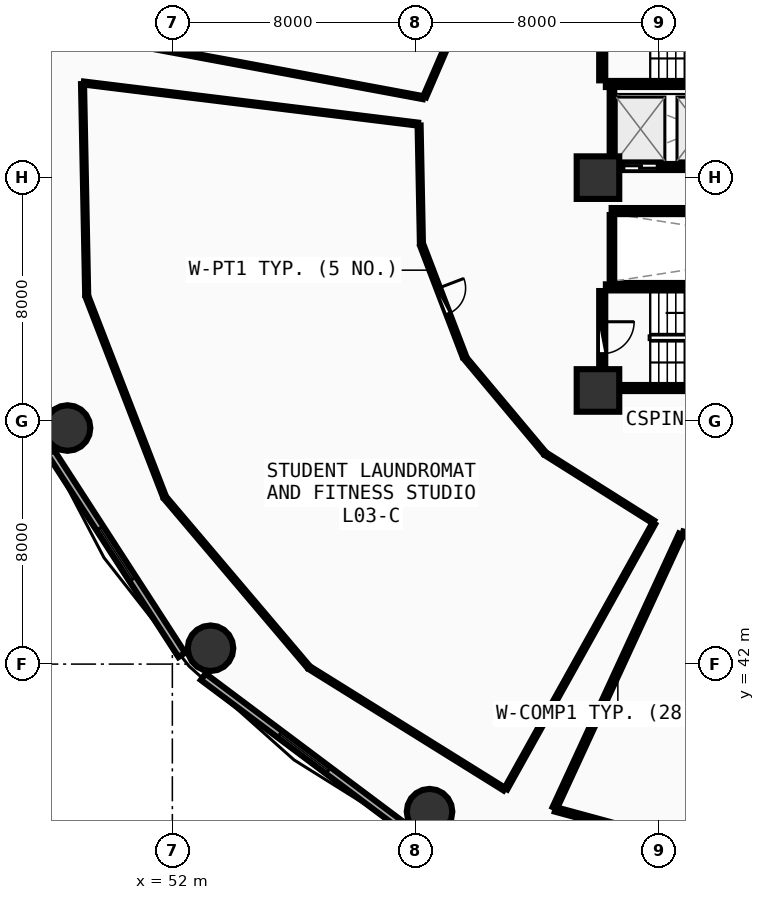
"""IFC4 building model, lengths in metres.
Left out: names, types, materials, properties, quantities, classifications, styles, units other than length and angle.
Written with IfcOpenShell. Run it as: python <this file> out.ifc"""

import sys

from ifc_helpers import new_model, si_unit, direction, frame, frame_2d, origin, origin_2d, place, context, subcontext, project, spatial, rectangle, circle, extrude, element, fill, save


model = new_model("IFC4")
c1 = context("Model", 3, precision=1e-05, world=origin(), true_north=direction((0.0, 1.0)))
c2 = subcontext(c1, "Body", "Model", "MODEL_VIEW")
j1 = project(units=[si_unit("LENGTHUNIT", "METRE"), si_unit("PLANEANGLEUNIT", "RADIAN")], contexts=[c1])
p1 = place(None, origin())
s1 = spatial("IfcSite", under=j1, at=p1, CompositionType="ELEMENT")
p2 = place(p1, origin())
s2 = spatial("IfcBuilding", under=s1, at=p2, CompositionType="ELEMENT")
p3 = place(p2, frame((0.0, 0.0, 13.5)))
s3 = spatial("IfcBuildingStorey", under=s2, at=p3, CompositionType="ELEMENT", Elevation=13.5)
for number, where, z_axis, x_axis in (
    (1, (66.0, 51.0, 0.0), (0.0, 0.0, 1.0), (1.0, 0.0, 0.0)),
    (2, (66.0, 58.0, 0.0), (0.0, 0.0, 1.0), (1.0, 0.0, 0.0)),
):
    element("IfcColumn", number, at=place(p3, frame(where, z_axis=z_axis, x_axis=x_axis)), inside=s3, PredefinedType="PILASTER", context=c2, shape_type="SweptSolid", body=[
        extrude(rectangle(XDim=1.4, YDim=1.4, at=origin_2d()), origin(), (0.0, 0.0, 1.0), 4.5),
    ])
for number, where, z_axis, x_axis in (
    (3, (48.553, 49.764, 0.0), (0.0, 0.0, 1.0), (1.0, 0.0, 0.0)),
    (4, (53.256, 42.522, 0.0), (0.0, 0.0, 1.0), (1.0, 0.0, 0.0)),
    (5, (60.46, 37.146, 0.0), (0.0, 0.0, 1.0), (1.0, 0.0, 0.0)),
):
    element("IfcColumn", number, at=place(p3, frame(where, z_axis=z_axis, x_axis=x_axis)), inside=s3, PredefinedType="COLUMN", context=c2, shape_type="SweptSolid", body=[
        extrude(circle(Radius=0.75, at=origin_2d()), origin(), (0.0, 0.0, 1.0), 4.5),
    ])
p4 = place(p3, frame((48.001, 48.967, 0.0), z_axis=(0.0, 0.0, 1.0), x_axis=(0.543005114258, -0.839729388488, 0.0)))
e6 = element("IfcWall", 6, at=p4, inside=s3, PredefinedType="SOLIDWALL", context=c2, shape_type="SweptSolid", body=[
    extrude(rectangle(XDim=7.938, YDim=0.26, at=frame_2d((3.969, 0.0))), origin(), (0.0, 0.0, 1.0), 4.085),
])
p5 = place(p4, frame((2.969, 0.0, 0.85)))
e7 = element("IfcOpeningElement", 7, at=p5, cuts=e6, PredefinedType="OPENING", context=c2, shape_type="SweptSolid", body=[
    extrude(rectangle(XDim=2.0, YDim=1.75, at=frame_2d((1.0, 0.875))), frame((0.0, 0.14, 0.0), z_axis=(0.0, -1.0, 0.0), x_axis=(1.0, 0.0, 0.0)), (0.0, 0.0, 1.0), 0.28),
])
p6 = place(p3, frame((53.016, 41.582, 0.0), z_axis=(0.0, 0.0, 1.0), x_axis=(0.80030733173, -0.599590005569, 0.0)))
e8 = element("IfcWall", 8, at=p6, inside=s3, PredefinedType="SOLIDWALL", context=c2, shape_type="SweptSolid", body=[
    extrude(rectangle(XDim=8.291, YDim=0.26, at=frame_2d((4.145, 0.0))), origin(), (0.0, 0.0, 1.0), 4.085),
])
p7 = place(p6, frame((3.145, 0.0, 0.85)))
e9 = element("IfcOpeningElement", 9, at=p7, cuts=e8, PredefinedType="OPENING", context=c2, shape_type="SweptSolid", body=[
    extrude(rectangle(XDim=2.0, YDim=1.75, at=frame_2d((1.0, 0.875))), frame((0.0, 0.14, 0.0), z_axis=(0.0, -1.0, 0.0), x_axis=(1.0, 0.0, 0.0)), (0.0, 0.0, 1.0), 0.28),
])
p8 = place(p3, frame((66.26, 61.08, 0.0), z_axis=(0.0, 0.0, 1.0), x_axis=(1.0, 0.0, 0.0)))
e10 = element("IfcWall", 10, at=p8, inside=s3, PredefinedType="SHEAR", context=c2, shape_type="SweptSolid", body=[
    extrude(rectangle(XDim=7.16, YDim=0.2, at=frame_2d((3.58, 0.0))), origin(), (0.0, 0.0, 1.0), 4.1),
])
p9 = place(p3, frame((66.14, 64.27, 0.0), z_axis=(0.0, 0.0, 1.0), x_axis=(0.0, -1.0, 0.0)))
e11 = element("IfcWall", 11, at=p9, inside=s3, PredefinedType="SHEAR", context=c2, shape_type="SweptSolid", body=[
    extrude(rectangle(XDim=3.07, YDim=0.2, at=frame_2d((1.535, 0.0))), origin(), (0.0, 0.0, 1.0), 4.1),
])
p10 = place(p9, frame((1.01, 0.0, 0.0)))
e12 = element("IfcOpeningElement", 12, at=p10, cuts=e11, PredefinedType="OPENING", context=c2, shape_type="SweptSolid", body=[
    extrude(rectangle(XDim=1.05, YDim=2.1, at=frame_2d((0.525, 1.05))), frame((0.0, 0.11, 0.0), z_axis=(0.0, -1.0, 0.0), x_axis=(1.0, 0.0, 0.0)), (0.0, 0.0, 1.0), 0.22),
])
for number, where, z_axis, x_axis in (
    (13, (66.26, 51.08, 0.0), (0.0, 0.0, 1.0), (1.0, 0.0, 0.0)),
    (14, (73.42, 54.39, 0.0), (0.0, 0.0, 1.0), (-1.0, 0.0, 0.0)),
):
    element("IfcWall", number, at=place(p3, frame(where, z_axis=z_axis, x_axis=x_axis)), inside=s3, PredefinedType="SHEAR", context=c2, shape_type="SweptSolid", body=[
        extrude(rectangle(XDim=7.16, YDim=0.2, at=frame_2d((3.58, 0.0))), origin(), (0.0, 0.0, 1.0), 4.1),
    ])
p11 = place(p3, frame((66.14, 54.27, 0.0), z_axis=(0.0, 0.0, 1.0), x_axis=(0.0, -1.0, 0.0)))
e15 = element("IfcWall", 15, at=p11, inside=s3, PredefinedType="SHEAR", context=c2, shape_type="SweptSolid", body=[
    extrude(rectangle(XDim=3.07, YDim=0.2, at=frame_2d((1.535, 0.0))), origin(), (0.0, 0.0, 1.0), 4.1),
])
p12 = place(p11, frame((1.01, 0.0, 0.0)))
e16 = element("IfcOpeningElement", 16, at=p12, cuts=e15, PredefinedType="OPENING", context=c2, shape_type="SweptSolid", body=[
    extrude(rectangle(XDim=1.05, YDim=2.1, at=frame_2d((0.525, 1.05))), frame((0.0, 0.11, 0.0), z_axis=(0.0, -1.0, 0.0), x_axis=(1.0, 0.0, 0.0)), (0.0, 0.0, 1.0), 0.22),
])
p13 = place(p3, frame((66.45, 58.35, 0.0), z_axis=(0.0, 0.0, 1.0), x_axis=(1.0, 0.0, 0.0)))
e17 = element("IfcWall", 17, at=p13, inside=s3, PredefinedType="SOLIDWALL", context=c2, shape_type="SweptSolid", body=[
    extrude(rectangle(XDim=6.0, YDim=0.2, at=frame_2d((3.0, 0.0))), origin(), (0.0, 0.0, 1.0), 4.09),
])
p14 = place(p13, frame((0.4, 0.0, 0.0)))
e18 = element("IfcOpeningElement", 18, at=p14, cuts=e17, PredefinedType="OPENING", context=c2, shape_type="SweptSolid", body=[
    extrude(rectangle(XDim=1.1, YDim=2.1, at=frame_2d((0.55, 1.05))), frame((0.0, 0.11, 0.0), z_axis=(0.0, -1.0, 0.0), x_axis=(1.0, 0.0, 0.0)), (0.0, 0.0, 1.0), 0.22),
])
p15 = place(p13, frame((2.4, 0.0, 0.0)))
e19 = element("IfcOpeningElement", 19, at=p15, cuts=e17, PredefinedType="OPENING", context=c2, shape_type="SweptSolid", body=[
    extrude(rectangle(XDim=1.1, YDim=2.1, at=frame_2d((0.55, 1.05))), frame((0.0, 0.11, 0.0), z_axis=(0.0, -1.0, 0.0), x_axis=(1.0, 0.0, 0.0)), (0.0, 0.0, 1.0), 0.22),
])
p16 = place(p13, frame((4.4, 0.0, 0.0)))
e20 = element("IfcOpeningElement", 20, at=p16, cuts=e17, PredefinedType="OPENING", context=c2, shape_type="SweptSolid", body=[
    extrude(rectangle(XDim=1.1, YDim=2.1, at=frame_2d((0.55, 1.05))), frame((0.0, 0.11, 0.0), z_axis=(0.0, -1.0, 0.0), x_axis=(1.0, 0.0, 0.0)), (0.0, 0.0, 1.0), 0.22),
])
p17 = place(p3, frame((66.46, 58.48, 0.0), z_axis=(0.0, 0.0, 1.0), x_axis=(0.0, 1.0, 0.0)))
e21 = element("IfcWall", 21, at=p17, inside=s3, PredefinedType="PARTITIONING", context=c2, shape_type="SweptSolid", body=[
    extrude(rectangle(XDim=2.46, YDim=0.15, at=frame_2d((1.23, 0.0))), origin(), (0.0, 0.0, 1.0), 4.09),
])
p18 = place(p3, frame((66.45, 56.9, 0.0), z_axis=(0.0, 0.0, 1.0), x_axis=(1.0, 0.0, 0.0)))
e22 = element("IfcWall", 22, at=p18, inside=s3, PredefinedType="SOLIDWALL", context=c2, shape_type="SweptSolid", body=[
    extrude(rectangle(XDim=14.4, YDim=0.2, at=frame_2d((7.2, 0.0))), origin(), (0.0, 0.0, 1.0), 4.09),
])
p19 = place(p3, frame((66.46, 54.48, 0.0), z_axis=(0.0, 0.0, 1.0), x_axis=(0.0, 1.0, 0.0)))
e23 = element("IfcWall", 23, at=p19, inside=s3, PredefinedType="PARTITIONING", context=c2, shape_type="SweptSolid", body=[
    extrude(rectangle(XDim=2.29, YDim=0.15, at=frame_2d((1.145, 0.0))), origin(), (0.0, 0.0, 1.0), 4.09),
])
p20 = place(p3, frame((60.214, 55.753, 0.0), z_axis=(0.0, 0.0, 1.0), x_axis=(0.357236014767, -0.934014148583, 0.0)))
e24 = element("IfcWall", 24, at=p20, inside=s3, PredefinedType="PARTITIONING", context=c2, shape_type="SweptSolid", body=[
    extrude(rectangle(XDim=3.878, YDim=0.12, at=frame_2d((1.939, 0.0))), origin(), (0.0, 0.0, 1.0), 4.09),
])
p21 = place(p20, frame((1.489, 0.0, 0.0)))
e25 = element("IfcOpeningElement", 25, at=p21, cuts=e24, PredefinedType="OPENING", context=c2, shape_type="SweptSolid", body=[
    extrude(rectangle(XDim=0.9, YDim=2.08, at=frame_2d((0.45, 1.04))), frame((0.0, 0.07, 0.0), z_axis=(0.0, -1.0, 0.0), x_axis=(1.0, 0.0, 0.0)), (0.0, 0.0, 1.0), 0.14),
])
p22 = place(p3, frame((61.904, 64.368, 0.0), z_axis=(0.0, 0.0, 1.0), x_axis=(-0.396638629538, -0.917974834927, 0.0)))
e26 = element("IfcWall", 26, at=p22, inside=s3, PredefinedType="PARTITIONING", context=c2, shape_type="SweptSolid", body=[
    extrude(rectangle(XDim=4.039, YDim=0.1, at=frame_2d((2.02, 0.0))), origin(), (0.0, 0.0, 1.0), 4.09),
])
p23 = place(p3, frame((60.247, 60.631, 0.0), z_axis=(0.0, 0.0, 1.0), x_axis=(-0.98315361887, 0.18278118531, 0.0)))
e27 = element("IfcWall", 27, at=p23, inside=s3, PredefinedType="PARTITIONING", context=c2, shape_type="SweptSolid", body=[
    extrude(rectangle(XDim=11.042, YDim=0.1, at=frame_2d((5.521, 0.0))), origin(), (0.0, 0.0, 1.0), 3.785),
])
p24 = place(p3, frame((60.117, 59.716, 0.0), z_axis=(0.0, 0.0, 1.0), x_axis=(0.01950509597, -0.999809757519, 0.0)))
e28 = element("IfcWall", 28, at=p24, inside=s3, PredefinedType="PARTITIONING", context=c2, shape_type="SweptSolid", body=[
    extrude(rectangle(XDim=3.868, YDim=0.1, at=frame_2d((1.934, 0.0))), origin(), (0.0, 0.0, 1.0), 3.485),
])
p25 = place(p3, frame((61.647, 52.044, 0.0), z_axis=(0.0, 0.0, 1.0), x_axis=(0.641987153188, -0.766715393834, 0.0)))
e29 = element("IfcWall", 29, at=p25, inside=s3, PredefinedType="PARTITIONING", context=c2, shape_type="SweptSolid", body=[
    extrude(rectangle(XDim=4.032, YDim=0.1, at=frame_2d((2.016, 0.0))), origin(), (0.0, 0.0, 1.0), 3.485),
])
p26 = place(p3, frame((64.295, 48.901, 0.0), z_axis=(0.0, 0.0, 1.0), x_axis=(0.845938242176, -0.533280873859, 0.0)))
e30 = element("IfcWall", 30, at=p26, inside=s3, PredefinedType="PARTITIONING", context=c2, shape_type="SweptSolid", body=[
    extrude(rectangle(XDim=4.167, YDim=0.1, at=frame_2d((2.084, 0.0))), origin(), (0.0, 0.0, 1.0), 3.485),
])
p27 = place(p3, frame((67.834, 46.622, 0.0), z_axis=(0.0, 0.0, 1.0), x_axis=(-0.486981509144, -0.873412279368, 0.0)))
e31 = element("IfcWall", 31, at=p27, inside=s3, PredefinedType="PARTITIONING", context=c2, shape_type="SweptSolid", body=[
    extrude(rectangle(XDim=9.984, YDim=0.1, at=frame_2d((4.992, 0.0))), origin(), (0.0, 0.0, 1.0), 3.485),
])
p28 = place(p3, frame((62.919, 37.888, 0.0), z_axis=(0.0, 0.0, 1.0), x_axis=(-0.848946333049, 0.52847906638, 0.0)))
e32 = element("IfcWall", 32, at=p28, inside=s3, PredefinedType="PARTITIONING", context=c2, shape_type="SweptSolid", body=[
    extrude(rectangle(XDim=7.527, YDim=0.1, at=frame_2d((3.763, 0.0))), origin(), (0.0, 0.0, 1.0), 3.485),
])
p29 = place(p3, frame((56.469, 41.917, 0.0), z_axis=(0.0, 0.0, 1.0), x_axis=(-0.646640152026, 0.762795197801, 0.0)))
e33 = element("IfcWall", 33, at=p29, inside=s3, PredefinedType="PARTITIONING", context=c2, shape_type="SweptSolid", body=[
    extrude(rectangle(XDim=7.258, YDim=0.1, at=frame_2d((3.629, 0.0))), origin(), (0.0, 0.0, 1.0), 3.485),
])
p30 = place(p3, frame((51.736, 47.521, 0.0), z_axis=(0.0, 0.0, 1.0), x_axis=(-0.361243648686, 0.932471461378, 0.0)))
e34 = element("IfcWall", 34, at=p30, inside=s3, PredefinedType="PARTITIONING", context=c2, shape_type="SweptSolid", body=[
    extrude(rectangle(XDim=7.026, YDim=0.1, at=frame_2d((3.513, 0.0))), origin(), (0.0, 0.0, 1.0), 3.485),
])
p31 = place(p3, frame((49.182, 54.15, 0.0), z_axis=(0.0, 0.0, 1.0), x_axis=(-0.019662782265, 0.999806668808, 0.0)))
e35 = element("IfcWall", 35, at=p31, inside=s3, PredefinedType="PARTITIONING", context=c2, shape_type="SweptSolid", body=[
    extrude(rectangle(XDim=6.928, YDim=0.1, at=frame_2d((3.464, 0.0))), origin(), (0.0, 0.0, 1.0), 3.485),
])
p32 = place(p3, frame((49.085, 61.112, 0.0), z_axis=(0.0, 0.0, 1.0), x_axis=(0.992530160612, -0.121999509325, 0.0)))
e36 = element("IfcWall", 36, at=p32, inside=s3, PredefinedType="PARTITIONING", context=c2, shape_type="SweptSolid", body=[
    extrude(rectangle(XDim=11.074, YDim=0.1, at=frame_2d((5.537, 0.0))), origin(), (0.0, 0.0, 1.0), 3.785),
])
p33 = place(p3, frame((68.787, 46.288, 0.0), z_axis=(0.0, 0.0, 1.0), x_axis=(0.964162769641, -0.265311427644, 0.0)))
e37 = element("IfcWall", 37, at=p33, inside=s3, PredefinedType="PARTITIONING", context=c2, shape_type="SweptSolid", body=[
    extrude(rectangle(XDim=2.344, YDim=0.15, at=frame_2d((1.172, 0.0))), origin(), (0.0, 0.0, 1.0), 4.09),
])
p34 = place(p3, frame((68.722, 36.1, 0.0), z_axis=(0.0, 0.0, 1.0), x_axis=(-0.964990226836, 0.262285840471, 0.0)))
e38 = element("IfcWall", 38, at=p34, inside=s3, PredefinedType="PARTITIONING", context=c2, shape_type="SweptSolid", body=[
    extrude(rectangle(XDim=4.273, YDim=0.15, at=frame_2d((2.137, 0.0))), origin(), (0.0, 0.0, 1.0), 3.485),
])
p35 = place(p3, frame((64.577, 37.267, 0.0), z_axis=(0.0, 0.0, 1.0), x_axis=(0.419273795464, 0.90785983744, 0.0)))
e39 = element("IfcWall", 39, at=p35, inside=s3, PredefinedType="PARTITIONING", context=c2, shape_type="SweptSolid", body=[
    extrude(rectangle(XDim=9.908, YDim=0.15, at=frame_2d((4.954, 0.0))), origin(), (0.0, 0.0, 1.0), 3.485),
])
p36 = place(p5, origin())
e40 = element("IfcWindow", 40, at=p36, inside=s3, PartitioningType="SINGLE_PANEL", PredefinedType="WINDOW", context=c2, shape_type="SweptSolid", body=[
    extrude(rectangle(XDim=2.0, YDim=1.75, at=frame_2d((1.0, 0.875))), frame((0.0, 0.03, 0.0), z_axis=(0.0, -1.0, 0.0), x_axis=(1.0, 0.0, 0.0)), (0.0, 0.0, 1.0), 0.06),
])
fill(e7, e40)
p37 = place(p7, origin())
e41 = element("IfcWindow", 41, at=p37, inside=s3, PartitioningType="SINGLE_PANEL", PredefinedType="WINDOW", context=c2, shape_type="SweptSolid", body=[
    extrude(rectangle(XDim=2.0, YDim=1.75, at=frame_2d((1.0, 0.875))), frame((0.0, 0.03, 0.0), z_axis=(0.0, -1.0, 0.0), x_axis=(1.0, 0.0, 0.0)), (0.0, 0.0, 1.0), 0.06),
])
fill(e9, e41)
p38 = place(p12, origin())
e42 = element("IfcDoor", 42, at=p38, inside=s3, OperationType="SINGLE_SWING_LEFT", PredefinedType="DOOR", context=c2, shape_type="SweptSolid", body=[
    extrude(rectangle(XDim=1.05, YDim=2.1, at=frame_2d((0.525, 1.05))), frame((0.0, 0.025, 0.0), z_axis=(0.0, -1.0, 0.0), x_axis=(1.0, 0.0, 0.0)), (0.0, 0.0, 1.0), 0.05),
])
fill(e16, e42)
p39 = place(p14, origin())
e43 = element("IfcDoor", 43, at=p39, inside=s3, OperationType="DOUBLE_DOOR_SLIDING", PredefinedType="DOOR", context=c2, shape_type="SweptSolid", body=[
    extrude(rectangle(XDim=1.1, YDim=2.1, at=frame_2d((0.55, 1.05))), frame((0.0, 0.025, 0.0), z_axis=(0.0, -1.0, 0.0), x_axis=(1.0, 0.0, 0.0)), (0.0, 0.0, 1.0), 0.05),
])
fill(e18, e43)
p40 = place(p15, origin())
e44 = element("IfcDoor", 44, at=p40, inside=s3, OperationType="DOUBLE_DOOR_SLIDING", PredefinedType="DOOR", context=c2, shape_type="SweptSolid", body=[
    extrude(rectangle(XDim=1.1, YDim=2.1, at=frame_2d((0.55, 1.05))), frame((0.0, 0.025, 0.0), z_axis=(0.0, -1.0, 0.0), x_axis=(1.0, 0.0, 0.0)), (0.0, 0.0, 1.0), 0.05),
])
fill(e19, e44)
p41 = place(p21, origin())
e45 = element("IfcDoor", 45, at=p41, inside=s3, OperationType="SINGLE_SWING_LEFT", PredefinedType="DOOR", context=c2, shape_type="SweptSolid", body=[
    extrude(rectangle(XDim=0.9, YDim=2.08, at=frame_2d((0.45, 1.04))), frame((0.0, 0.025, 0.0), z_axis=(0.0, -1.0, 0.0), x_axis=(1.0, 0.0, 0.0)), (0.0, 0.0, 1.0), 0.05),
])
fill(e25, e45)
save(model, sys.argv[1])
